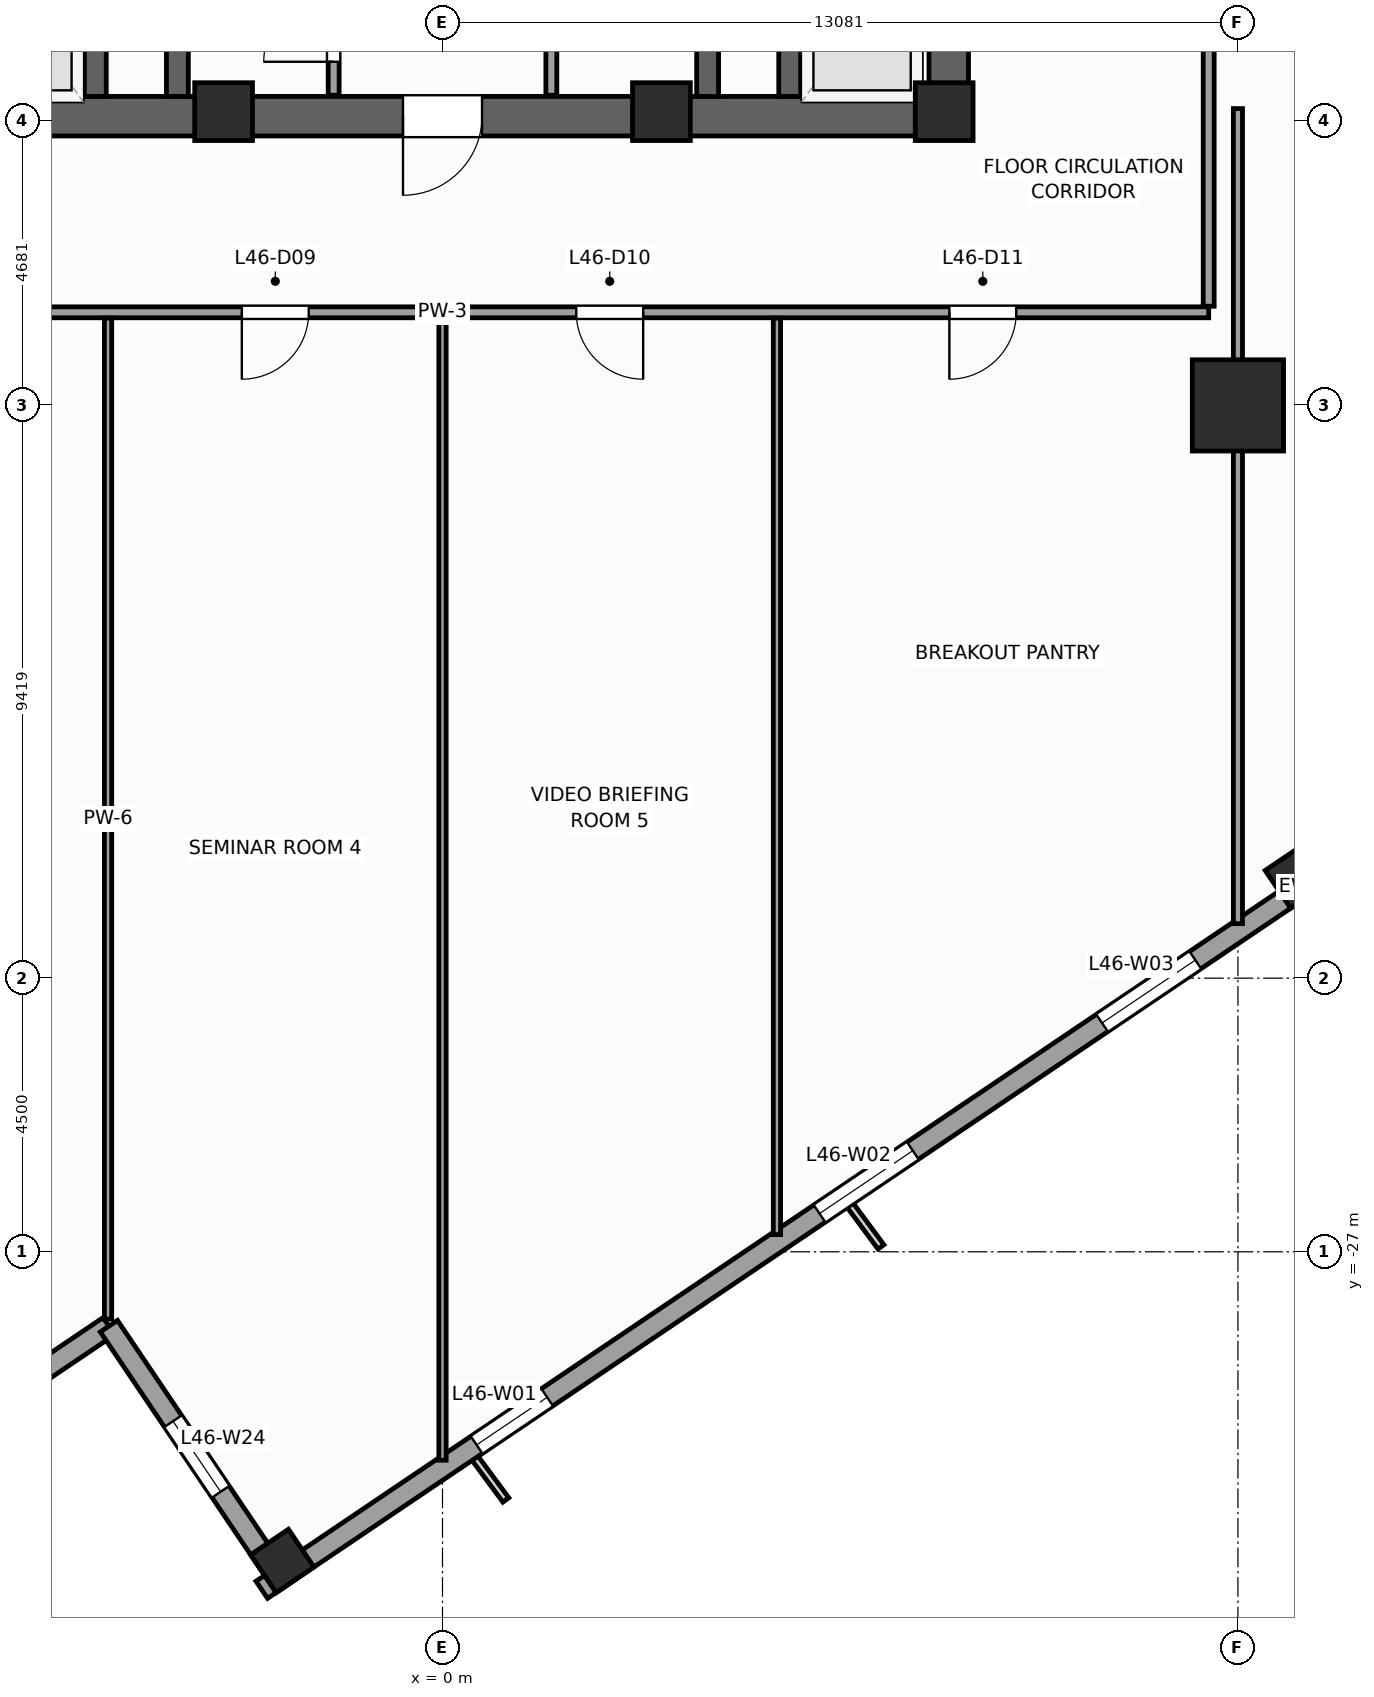
"""IFC4 building model, lengths in metres.
Left out: names, types, materials, properties, quantities, classifications, styles, units other than length and angle.
Written with IfcOpenShell. Run it as: python <this file> out.ifc"""

import sys

from ifc_helpers import new_model, si_unit, direction, frame, frame_2d, origin, origin_2d, place, context, subcontext, project, spatial, rectangle, extrude, source, transform, mapped, element, fill, save


model = new_model("IFC4")
c1 = context("Model", 3, precision=1e-05, world=origin(), true_north=direction((0.0, 1.0)))
c2 = subcontext(c1, "Body", "Model", "MODEL_VIEW")
j1 = project(units=[si_unit("LENGTHUNIT", "METRE"), si_unit("PLANEANGLEUNIT", "RADIAN")], contexts=[c1])
p1 = place(None, origin())
s1 = spatial("IfcSite", under=j1, at=p1, CompositionType="ELEMENT")
p2 = place(p1, origin())
s2 = spatial("IfcBuilding", under=s1, at=p2, CompositionType="ELEMENT")
p3 = place(p2, frame((0.0, 0.0, 192.4)))
s3 = spatial("IfcBuildingStorey", under=s2, at=p3, CompositionType="ELEMENT", Elevation=192.4)
p4 = place(p3, frame((-8.65, -8.325, 0.0), z_axis=(0.0, 0.0, 1.0), x_axis=(1.0, 0.0, 0.0)))
e1 = element("IfcWall", 1, at=p4, inside=s3, PredefinedType="SHEAR", context=c2, shape_type="SweptSolid", body=[
    extrude(rectangle(XDim=17.3, YDim=0.65, at=frame_2d((8.65, 0.0))), origin(), (0.0, 0.0, 1.0), 4.0),
])
p5 = place(p4, frame((8.0, 0.0, 0.0)))
e2 = element("IfcOpeningElement", 2, at=p5, cuts=e1, PredefinedType="OPENING", context=c2, shape_type="SweptSolid", body=[
    extrude(rectangle(XDim=1.3, YDim=2.2, at=frame_2d((0.65, 1.1))), frame((0.0, 0.335, 0.0), z_axis=(0.0, -1.0, 0.0), x_axis=(1.0, 0.0, 0.0)), (0.0, 0.0, 1.0), 0.67),
])
p6 = place(p3, frame((8.325, -8.0, 0.0), z_axis=(0.0, 0.0, 1.0), x_axis=(0.0, 1.0, 0.0)))
e3 = element("IfcWall", 3, at=p6, inside=s3, PredefinedType="SHEAR", context=c2, shape_type="SweptSolid", body=[
    extrude(rectangle(XDim=16.0, YDim=0.65, at=frame_2d((8.0, 0.0))), origin(), (0.0, 0.0, 1.0), 4.0),
])
p7 = place(p6, frame((4.69, 0.0, 0.0)))
e4 = element("IfcOpeningElement", 4, at=p7, cuts=e3, PredefinedType="OPENING", context=c2, shape_type="SweptSolid", body=[
    extrude(rectangle(XDim=1.3, YDim=2.2, at=frame_2d((0.65, 1.1))), frame((0.0, 0.335, 0.0), z_axis=(0.0, -1.0, 0.0), x_axis=(1.0, 0.0, 0.0)), (0.0, 0.0, 1.0), 0.67),
])
for number, where, z_axis, x_axis in (
    (5, (-4.36, -8.0, 0.0), (0.0, 0.0, 1.0), (0.0, 1.0, 0.0)),
    (6, (4.36, -8.0, 0.0), (0.0, 0.0, 1.0), (0.0, 1.0, 0.0)),
):
    element("IfcWall", number, at=place(p3, frame(where, z_axis=z_axis, x_axis=x_axis)), inside=s3, PredefinedType="SHEAR", context=c2, shape_type="SweptSolid", body=[
        extrude(rectangle(XDim=16.0, YDim=0.36, at=frame_2d((8.0, 0.0))), origin(), (0.0, 0.0, 1.0), 4.0),
    ])
for number, where, z_axis, x_axis in (
    (7, (-5.71, -8.0, 0.0), (0.0, 0.0, 1.0), (0.0, 1.0, 0.0)),
    (8, (5.71, -8.0, 0.0), (0.0, 0.0, 1.0), (0.0, 1.0, 0.0)),
):
    element("IfcWall", number, at=place(p3, frame(where, z_axis=z_axis, x_axis=x_axis)), inside=s3, PredefinedType="SHEAR", context=c2, shape_type="SweptSolid", body=[
        extrude(rectangle(XDim=2.54, YDim=0.36, at=frame_2d((1.27, 0.0))), origin(), (0.0, 0.0, 1.0), 4.0),
    ])
m1 = source(origin(), c2, "Body", "SweptSolid", [
    extrude(rectangle(XDim=0.95, YDim=0.95, at=origin_2d()), origin(), (0.0, 0.0, 1.0), 4.0),
])
for number, where, z_axis, x_axis in (
    (9, (8.25, -8.25, 0.0), (0.0, 0.0, 1.0), (1.0, 0.0, 0.0)),
    (10, (-3.6, -8.25, 0.0), (0.0, 0.0, 1.0), (1.0, 0.0, 0.0)),
    (11, (3.6, -8.25, 0.0), (0.0, 0.0, 1.0), (1.0, 0.0, 0.0)),
):
    element("IfcColumn", number, at=place(p3, frame(where, z_axis=z_axis, x_axis=x_axis)), inside=s3, PredefinedType="PILASTER", context=c2, shape_type="MappedRepresentation", body=[
        mapped(m1, transform((0.0, 0.0, 0.0), scale=1.0)),
    ])
m2 = source(origin(), c2, "Body", "SweptSolid", [
    extrude(rectangle(XDim=1.5, YDim=1.5, at=origin_2d()), origin(), (0.0, 0.0, 1.0), 4.0),
])
p8 = place(p3, frame((13.081, -13.081, 0.0), z_axis=(0.0, 0.0, 1.0), x_axis=(1.0, 0.0, 0.0)))
e12 = element("IfcColumn", 12, at=p8, inside=s3, PredefinedType="COLUMN", context=c2, shape_type="MappedRepresentation", body=[
    mapped(m2, transform((0.0, 0.0, 0.0), scale=1.0)),
])
m3 = source(origin(), c2, "Body", "SweptSolid", [
    extrude(rectangle(XDim=0.75, YDim=0.75, at=origin_2d()), origin(), (0.0, 0.0, 1.0), 4.0),
])
for number, where, z_axis, x_axis in (
    (13, (-2.635, -32.083, 0.0), (0.0, 0.0, 1.0), (0.829, 0.559, 0.0)),
    (14, (14.05, -20.83, 0.0), (0.0, 0.0, 1.0), (0.829, 0.559, 0.0)),
):
    element("IfcColumn", number, at=place(p3, frame(where, z_axis=z_axis, x_axis=x_axis)), inside=s3, PredefinedType="COLUMN", context=c2, shape_type="MappedRepresentation", body=[
        mapped(m3, transform((0.0, 0.0, 0.0), scale=1.0)),
    ])
p9 = place(p3, frame((-2.972, -32.558, 0.0), z_axis=(0.0, 0.0, 1.0), x_axis=(0.829036218961, 0.559194910251, 0.0)))
e15 = element("IfcWall", 15, at=p9, inside=s3, PredefinedType="STANDARD", context=c2, shape_type="SweptSolid", body=[
    extrude(rectangle(XDim=41.34, YDim=0.34, at=frame_2d((20.67, 0.0))), origin(), (0.0, 0.0, 1.0), 3.04),
])
p10 = place(p9, frame((4.261, 0.0, 0.56)))
e16 = element("IfcOpeningElement", 16, at=p10, cuts=e15, PredefinedType="OPENING", context=c2, shape_type="SweptSolid", body=[
    extrude(rectangle(XDim=1.4, YDim=2.4, at=frame_2d((0.7, 1.2))), frame((0.0, 0.18, 0.0), z_axis=(0.0, -1.0, 0.0), x_axis=(1.0, 0.0, 0.0)), (0.0, 0.0, 1.0), 0.36),
])
p11 = place(p9, frame((11.064, 0.0, 0.61)))
e17 = element("IfcOpeningElement", 17, at=p11, cuts=e15, PredefinedType="OPENING", context=c2, shape_type="SweptSolid", body=[
    extrude(rectangle(XDim=1.85, YDim=2.35, at=frame_2d((0.925, 1.175))), frame((0.0, 0.18, 0.0), z_axis=(0.0, -1.0, 0.0), x_axis=(1.0, 0.0, 0.0)), (0.0, 0.0, 1.0), 0.36),
])
p12 = place(p9, frame((16.668, 0.0, 0.61)))
e18 = element("IfcOpeningElement", 18, at=p12, cuts=e15, PredefinedType="OPENING", context=c2, shape_type="SweptSolid", body=[
    extrude(rectangle(XDim=1.85, YDim=2.35, at=frame_2d((0.925, 1.175))), frame((0.0, 0.18, 0.0), z_axis=(0.0, -1.0, 0.0), x_axis=(1.0, 0.0, 0.0)), (0.0, 0.0, 1.0), 0.36),
])
p13 = place(p9, frame((27.186, 0.0, 0.61)))
e19 = element("IfcOpeningElement", 19, at=p13, cuts=e15, PredefinedType="OPENING", context=c2, shape_type="SweptSolid", body=[
    extrude(rectangle(XDim=1.85, YDim=2.35, at=frame_2d((0.925, 1.175))), frame((0.0, 0.18, 0.0), z_axis=(0.0, -1.0, 0.0), x_axis=(1.0, 0.0, 0.0)), (0.0, 0.0, 1.0), 0.36),
])
p14 = place(p9, frame((34.852, 0.0, 0.56)))
e20 = element("IfcOpeningElement", 20, at=p14, cuts=e15, PredefinedType="OPENING", context=c2, shape_type="SweptSolid", body=[
    extrude(rectangle(XDim=1.4, YDim=2.4, at=frame_2d((0.7, 1.2))), frame((0.0, 0.18, 0.0), z_axis=(0.0, -1.0, 0.0), x_axis=(1.0, 0.0, 0.0)), (0.0, 0.0, 1.0), 0.36),
])
p15 = place(p3, frame((-9.631, -31.019, 0.0), z_axis=(0.0, 0.0, 1.0), x_axis=(0.829025804298, 0.559210350234, 0.0)))
e21 = element("IfcWall", 21, at=p15, inside=s3, PredefinedType="STANDARD", context=c2, shape_type="SweptSolid", body=[
    extrude(rectangle(XDim=5.0, YDim=0.34, at=frame_2d((2.5, 0.0))), origin(), (0.0, 0.0, 1.0), 3.74),
])
p16 = place(p3, frame((-5.486, -28.223, 0.0), z_axis=(0.0, 0.0, 1.0), x_axis=(0.559171107879, -0.82905227345, 0.0)))
e22 = element("IfcWall", 22, at=p16, inside=s3, PredefinedType="STANDARD", context=c2, shape_type="SweptSolid", body=[
    extrude(rectangle(XDim=5.17, YDim=0.34, at=frame_2d((2.585, 0.0))), origin(), (0.0, 0.0, 1.0), 3.04),
])
p17 = place(p16, frame((1.885, 0.0, 0.56)))
e23 = element("IfcOpeningElement", 23, at=p17, cuts=e22, PredefinedType="OPENING", context=c2, shape_type="SweptSolid", body=[
    extrude(rectangle(XDim=1.4, YDim=2.4, at=frame_2d((0.7, 1.2))), frame((0.0, 0.18, 0.0), z_axis=(0.0, -1.0, 0.0), x_axis=(1.0, 0.0, 0.0)), (0.0, 0.0, 1.0), 0.36),
])
p18 = place(p3, frame((-1.79, -7.98, 0.0), z_axis=(0.0, 0.0, 1.0), x_axis=(0.0, 1.0, 0.0)))
e24 = element("IfcWall", 24, at=p18, inside=s3, PredefinedType="PARTITIONING", context=c2, shape_type="SweptSolid", body=[
    extrude(rectangle(XDim=12.38, YDim=0.18, at=frame_2d((6.19, 0.0))), origin(), (0.0, 0.0, 1.0), 3.74),
])
p19 = place(p18, frame((4.6, 0.0, 0.0)))
e25 = element("IfcOpeningElement", 25, at=p19, cuts=e24, PredefinedType="OPENING", context=c2, shape_type="SweptSolid", body=[
    extrude(rectangle(XDim=1.1, YDim=2.2, at=frame_2d((0.55, 1.1))), frame((0.0, 0.1, 0.0), z_axis=(0.0, -1.0, 0.0), x_axis=(1.0, 0.0, 0.0)), (0.0, 0.0, 1.0), 0.2),
])
p20 = place(p18, frame((6.66, 0.0, 0.0)))
e26 = element("IfcOpeningElement", 26, at=p20, cuts=e24, PredefinedType="OPENING", context=c2, shape_type="SweptSolid", body=[
    extrude(rectangle(XDim=1.1, YDim=2.2, at=frame_2d((0.55, 1.1))), frame((0.0, 0.1, 0.0), z_axis=(0.0, -1.0, 0.0), x_axis=(1.0, 0.0, 0.0)), (0.0, 0.0, 1.0), 0.2),
])
p21 = place(p18, frame((0.55, 0.0, 0.0)))
e27 = element("IfcOpeningElement", 27, at=p21, cuts=e24, PredefinedType="OPENING", context=c2, shape_type="SweptSolid", body=[
    extrude(rectangle(XDim=1.15, YDim=2.25, at=frame_2d((0.575, 1.125))), frame((0.0, 0.1, 0.0), z_axis=(0.0, -1.0, 0.0), x_axis=(1.0, 0.0, 0.0)), (0.0, 0.0, 1.0), 0.2),
])
p22 = place(p18, frame((2.72, 0.0, 0.0)))
e28 = element("IfcOpeningElement", 28, at=p22, cuts=e24, PredefinedType="OPENING", context=c2, shape_type="SweptSolid", body=[
    extrude(rectangle(XDim=0.88, YDim=2.1, at=frame_2d((0.44, 1.05))), frame((0.0, 0.1, 0.0), z_axis=(0.0, -1.0, 0.0), x_axis=(1.0, 0.0, 0.0)), (0.0, 0.0, 1.0), 0.2),
])
p23 = place(p3, frame((1.79, -7.98, 0.0), z_axis=(0.0, 0.0, 1.0), x_axis=(0.0, 1.0, 0.0)))
e29 = element("IfcWall", 29, at=p23, inside=s3, PredefinedType="PARTITIONING", context=c2, shape_type="SweptSolid", body=[
    extrude(rectangle(XDim=12.38, YDim=0.18, at=frame_2d((6.19, 0.0))), origin(), (0.0, 0.0, 1.0), 3.74),
])
p24 = place(p23, frame((4.6, 0.0, 0.0)))
e30 = element("IfcOpeningElement", 30, at=p24, cuts=e29, PredefinedType="OPENING", context=c2, shape_type="SweptSolid", body=[
    extrude(rectangle(XDim=1.1, YDim=2.2, at=frame_2d((0.55, 1.1))), frame((0.0, 0.1, 0.0), z_axis=(0.0, -1.0, 0.0), x_axis=(1.0, 0.0, 0.0)), (0.0, 0.0, 1.0), 0.2),
])
p25 = place(p23, frame((6.66, 0.0, 0.0)))
e31 = element("IfcOpeningElement", 31, at=p25, cuts=e29, PredefinedType="OPENING", context=c2, shape_type="SweptSolid", body=[
    extrude(rectangle(XDim=1.1, YDim=2.2, at=frame_2d((0.55, 1.1))), frame((0.0, 0.1, 0.0), z_axis=(0.0, -1.0, 0.0), x_axis=(1.0, 0.0, 0.0)), (0.0, 0.0, 1.0), 0.2),
])
p26 = place(p23, frame((1.4, 0.0, 0.0)))
e32 = element("IfcOpeningElement", 32, at=p26, cuts=e29, PredefinedType="OPENING", context=c2, shape_type="SweptSolid", body=[
    extrude(rectangle(XDim=1.15, YDim=2.25, at=frame_2d((0.575, 1.125))), frame((0.0, 0.1, 0.0), z_axis=(0.0, -1.0, 0.0), x_axis=(1.0, 0.0, 0.0)), (0.0, 0.0, 1.0), 0.2),
])
p27 = place(p3, frame((-12.6, -11.55, 0.0), z_axis=(0.0, 0.0, 1.0), x_axis=(1.0, 0.0, 0.0)))
e33 = element("IfcWall", 33, at=p27, inside=s3, PredefinedType="PARTITIONING", context=c2, shape_type="SweptSolid", body=[
    extrude(rectangle(XDim=25.2, YDim=0.18, at=frame_2d((12.6, 0.0))), origin(), (0.0, 0.0, 1.0), 3.74),
])
p28 = place(p27, frame((3.165, 0.0, 0.0)))
e34 = element("IfcOpeningElement", 34, at=p28, cuts=e33, PredefinedType="OPENING", context=c2, shape_type="SweptSolid", body=[
    extrude(rectangle(XDim=1.1, YDim=2.2, at=frame_2d((0.55, 1.1))), frame((0.0, 0.1, 0.0), z_axis=(0.0, -1.0, 0.0), x_axis=(1.0, 0.0, 0.0)), (0.0, 0.0, 1.0), 0.2),
])
p29 = place(p27, frame((9.3, 0.0, 0.0)))
e35 = element("IfcOpeningElement", 35, at=p29, cuts=e33, PredefinedType="OPENING", context=c2, shape_type="SweptSolid", body=[
    extrude(rectangle(XDim=1.1, YDim=2.2, at=frame_2d((0.55, 1.1))), frame((0.0, 0.1, 0.0), z_axis=(0.0, -1.0, 0.0), x_axis=(1.0, 0.0, 0.0)), (0.0, 0.0, 1.0), 0.2),
])
p30 = place(p27, frame((14.8, 0.0, 0.0)))
e36 = element("IfcOpeningElement", 36, at=p30, cuts=e33, PredefinedType="OPENING", context=c2, shape_type="SweptSolid", body=[
    extrude(rectangle(XDim=1.1, YDim=2.2, at=frame_2d((0.55, 1.1))), frame((0.0, 0.1, 0.0), z_axis=(0.0, -1.0, 0.0), x_axis=(1.0, 0.0, 0.0)), (0.0, 0.0, 1.0), 0.2),
])
p31 = place(p27, frame((20.936, 0.0, 0.0)))
e37 = element("IfcOpeningElement", 37, at=p31, cuts=e33, PredefinedType="OPENING", context=c2, shape_type="SweptSolid", body=[
    extrude(rectangle(XDim=1.1, YDim=2.2, at=frame_2d((0.55, 1.1))), frame((0.0, 0.1, 0.0), z_axis=(0.0, -1.0, 0.0), x_axis=(1.0, 0.0, 0.0)), (0.0, 0.0, 1.0), 0.2),
])
p32 = place(p3, frame((12.6, -11.45, 0.0), z_axis=(0.0, 0.0, 1.0), x_axis=(0.0, 1.0, 0.0)))
e38 = element("IfcWall", 38, at=p32, inside=s3, PredefinedType="PARTITIONING", context=c2, shape_type="SweptSolid", body=[
    extrude(rectangle(XDim=15.25, YDim=0.18, at=frame_2d((7.625, 0.0))), origin(), (0.0, 0.0, 1.0), 3.74),
])
p33 = place(p32, frame((13.21, 0.0, 0.0)))
e39 = element("IfcOpeningElement", 39, at=p33, cuts=e38, PredefinedType="OPENING", context=c2, shape_type="SweptSolid", body=[
    extrude(rectangle(XDim=1.1, YDim=2.2, at=frame_2d((0.55, 1.1))), frame((0.0, 0.1, 0.0), z_axis=(0.0, -1.0, 0.0), x_axis=(1.0, 0.0, 0.0)), (0.0, 0.0, 1.0), 0.2),
])
p34 = place(p32, frame((5.5, 0.0, 0.0)))
e40 = element("IfcOpeningElement", 40, at=p34, cuts=e38, PredefinedType="OPENING", context=c2, shape_type="SweptSolid", body=[
    extrude(rectangle(XDim=1.1, YDim=2.2, at=frame_2d((0.55, 1.1))), frame((0.0, 0.1, 0.0), z_axis=(0.0, -1.0, 0.0), x_axis=(1.0, 0.0, 0.0)), (0.0, 0.0, 1.0), 0.2),
])
p35 = place(p32, frame((10.175, 0.0, 0.0)))
e41 = element("IfcOpeningElement", 41, at=p35, cuts=e38, PredefinedType="OPENING", context=c2, shape_type="SweptSolid", body=[
    extrude(rectangle(XDim=1.1, YDim=2.2, at=frame_2d((0.55, 1.1))), frame((0.0, 0.1, 0.0), z_axis=(0.0, -1.0, 0.0), x_axis=(1.0, 0.0, 0.0)), (0.0, 0.0, 1.0), 0.2),
])
p36 = place(p3, frame((-5.5, -28.105, 0.0), z_axis=(0.0, 0.0, 1.0), x_axis=(0.0, 1.0, 0.0)))
e42 = element("IfcWall", 42, at=p36, inside=s3, PredefinedType="PARTITIONING", context=c2, shape_type="SweptSolid", body=[
    extrude(rectangle(XDim=16.46, YDim=0.12, at=frame_2d((8.23, 0.0))), origin(), (0.0, 0.0, 1.0), 3.74),
])
p37 = place(p3, frame((0.0, -30.427, 0.0), z_axis=(0.0, 0.0, 1.0), x_axis=(0.0, 1.0, 0.0)))
e43 = element("IfcWall", 43, at=p37, inside=s3, PredefinedType="PARTITIONING", context=c2, shape_type="SweptSolid", body=[
    extrude(rectangle(XDim=18.782, YDim=0.12, at=frame_2d((9.391, 0.0))), origin(), (0.0, 0.0, 1.0), 3.74),
])
p38 = place(p3, frame((5.5, -26.717, 0.0), z_axis=(0.0, 0.0, 1.0), x_axis=(0.0, 1.0, 0.0)))
e44 = element("IfcWall", 44, at=p38, inside=s3, PredefinedType="PARTITIONING", context=c2, shape_type="SweptSolid", body=[
    extrude(rectangle(XDim=15.072, YDim=0.12, at=frame_2d((7.536, 0.0))), origin(), (0.0, 0.0, 1.0), 3.74),
])
p39 = place(p3, frame((13.081, -8.2, 0.0), z_axis=(0.0, 0.0, 1.0), x_axis=(0.0, -1.0, 0.0)))
e45 = element("IfcWall", 45, at=p39, inside=s3, PredefinedType="PARTITIONING", context=c2, shape_type="SweptSolid", body=[
    extrude(rectangle(XDim=13.404, YDim=0.15, at=frame_2d((6.702, 0.0))), origin(), (0.0, 0.0, 1.0), 2.84),
])
m4 = source(origin(), c2, "Body", "SweptSolid", [
    extrude(rectangle(XDim=1.4, YDim=2.4, at=frame_2d((0.7, 1.2))), frame((0.0, 0.03, 0.0), z_axis=(0.0, -1.0, 0.0), x_axis=(1.0, 0.0, 0.0)), (0.0, 0.0, 1.0), 0.06),
])
p40 = place(p10, origin())
e46 = element("IfcWindow", 46, at=p40, inside=s3, PartitioningType="SINGLE_PANEL", PredefinedType="WINDOW", context=c2, shape_type="MappedRepresentation", body=[
    mapped(m4, transform((0.0, 0.0, 0.0), scale=1.0)),
])
fill(e16, e46)
m5 = source(origin(), c2, "Body", "SweptSolid", [
    extrude(rectangle(XDim=1.85, YDim=2.35, at=frame_2d((0.925, 1.175))), frame((0.0, 0.03, 0.0), z_axis=(0.0, -1.0, 0.0), x_axis=(1.0, 0.0, 0.0)), (0.0, 0.0, 1.0), 0.06),
])
p41 = place(p11, origin())
e47 = element("IfcWindow", 47, at=p41, inside=s3, PartitioningType="SINGLE_PANEL", PredefinedType="WINDOW", context=c2, shape_type="MappedRepresentation", body=[
    mapped(m5, transform((0.0, 0.0, 0.0), scale=1.0)),
])
fill(e17, e47)
p42 = place(p12, origin())
e48 = element("IfcWindow", 48, at=p42, inside=s3, PartitioningType="SINGLE_PANEL", PredefinedType="WINDOW", context=c2, shape_type="MappedRepresentation", body=[
    mapped(m5, transform((0.0, 0.0, 0.0), scale=1.0)),
])
fill(e18, e48)
p43 = place(p17, origin())
e49 = element("IfcWindow", 49, at=p43, inside=s3, PartitioningType="SINGLE_PANEL", PredefinedType="WINDOW", context=c2, shape_type="MappedRepresentation", body=[
    mapped(m4, transform((0.0, 0.0, 0.0), scale=1.0)),
])
fill(e23, e49)
m6 = source(origin(), c2, "Body", "SweptSolid", [
    extrude(rectangle(XDim=1.3, YDim=2.2, at=frame_2d((0.65, 1.1))), frame((0.0, 0.025, 0.0), z_axis=(0.0, -1.0, 0.0), x_axis=(1.0, 0.0, 0.0)), (0.0, 0.0, 1.0), 0.05),
])
p44 = place(p5, frame((1.3, 0.0, 0.0), z_axis=(0.0, 0.0, 1.0), x_axis=(-1.0, 0.0, 0.0)))
e50 = element("IfcDoor", 50, at=p44, inside=s3, OperationType="SINGLE_SWING_LEFT", PredefinedType="DOOR", context=c2, shape_type="MappedRepresentation", body=[
    mapped(m6, transform((0.0, 0.0, 0.0), scale=1.0)),
])
fill(e2, e50)
m7 = source(origin(), c2, "Body", "SweptSolid", [
    extrude(rectangle(XDim=1.15, YDim=2.25, at=frame_2d((0.575, 1.125))), frame((0.0, 0.025, 0.0), z_axis=(0.0, -1.0, 0.0), x_axis=(1.0, 0.0, 0.0)), (0.0, 0.0, 1.0), 0.05),
])
p45 = place(p21, origin())
e51 = element("IfcDoor", 51, at=p45, inside=s3, OperationType="SINGLE_SWING_LEFT", PredefinedType="DOOR", context=c2, shape_type="MappedRepresentation", body=[
    mapped(m7, transform((0.0, 0.0, 0.0), scale=1.0)),
])
fill(e27, e51)
m8 = source(origin(), c2, "Body", "SweptSolid", [
    extrude(rectangle(XDim=1.1, YDim=2.2, at=frame_2d((0.55, 1.1))), frame((0.0, 0.025, 0.0), z_axis=(0.0, -1.0, 0.0), x_axis=(1.0, 0.0, 0.0)), (0.0, 0.0, 1.0), 0.05),
])
p46 = place(p29, frame((1.1, 0.0, 0.0), z_axis=(0.0, 0.0, 1.0), x_axis=(-1.0, 0.0, 0.0)))
e52 = element("IfcDoor", 52, at=p46, inside=s3, OperationType="SINGLE_SWING_LEFT", PredefinedType="DOOR", context=c2, shape_type="MappedRepresentation", body=[
    mapped(m8, transform((0.0, 0.0, 0.0), scale=1.0)),
])
fill(e35, e52)
p47 = place(p30, frame((1.1, 0.0, 0.0), z_axis=(0.0, 0.0, 1.0), x_axis=(-1.0, 0.0, 0.0)))
e53 = element("IfcDoor", 53, at=p47, inside=s3, OperationType="SINGLE_SWING_RIGHT", PredefinedType="DOOR", context=c2, shape_type="MappedRepresentation", body=[
    mapped(m8, transform((0.0, 0.0, 0.0), scale=1.0)),
])
fill(e36, e53)
p48 = place(p31, frame((1.1, 0.0, 0.0), z_axis=(0.0, 0.0, 1.0), x_axis=(-1.0, 0.0, 0.0)))
e54 = element("IfcDoor", 54, at=p48, inside=s3, OperationType="SINGLE_SWING_LEFT", PredefinedType="DOOR", context=c2, shape_type="MappedRepresentation", body=[
    mapped(m8, transform((0.0, 0.0, 0.0), scale=1.0)),
])
fill(e37, e54)
save(model, sys.argv[1])
